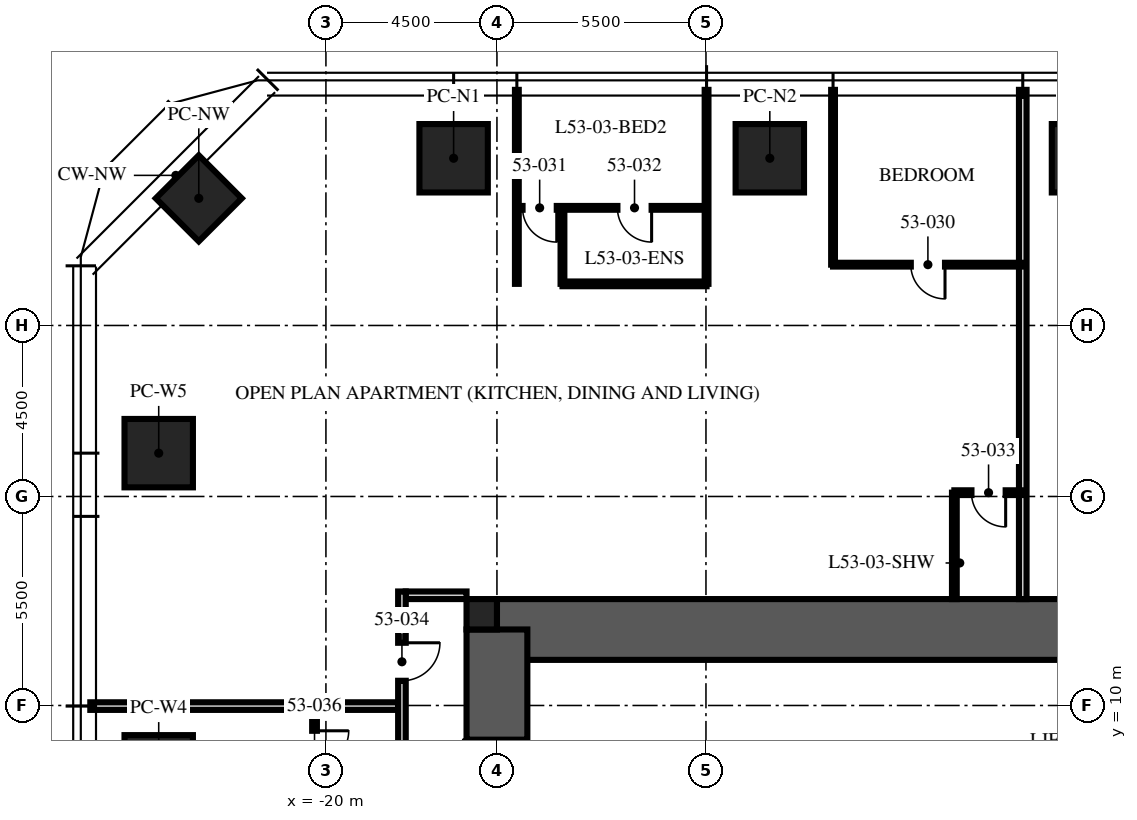
"""IFC4 building model, lengths in metres.
Left out: names, types, materials, properties, quantities, classifications, styles, units other than length and angle.
Written with IfcOpenShell. Run it as: python <this file> out.ifc"""

import sys

from ifc_helpers import new_model, si_unit, direction, frame, frame_2d, origin, origin_2d, place, context, subcontext, project, spatial, rectangle, extrude, element, fill, save


model = new_model("IFC4")
c1 = context("Model", 3, precision=1e-05, world=origin(), true_north=direction((0.0, 1.0)))
c2 = subcontext(c1, "Body", "Model", "MODEL_VIEW")
j1 = project(units=[si_unit("LENGTHUNIT", "METRE"), si_unit("PLANEANGLEUNIT", "RADIAN")], contexts=[c1])
p1 = place(None, origin())
s1 = spatial("IfcSite", under=j1, at=p1, CompositionType="ELEMENT")
p2 = place(p1, origin())
s2 = spatial("IfcBuilding", under=s1, at=p2, CompositionType="ELEMENT")
p3 = place(p2, frame((0.0, 0.0, 214.5)))
s3 = spatial("IfcBuildingStorey", under=s2, at=p3, CompositionType="ELEMENT", Elevation=214.5)
p4 = place(p3, frame((-15.5, 12.0, -0.25), z_axis=(0.0, 0.0, 1.0), x_axis=(1.0, 0.0, 0.0)))
e1 = element("IfcWall", 1, at=p4, inside=s3, PredefinedType="SHEAR", context=c2, shape_type="SweptSolid", body=[
    extrude(rectangle(XDim=31.0, YDim=1.6, at=frame_2d((15.5, 0.0))), origin(), (0.0, 0.0, 1.0), 3.75),
])
p5 = place(p3, frame((-15.5, -12.0, -0.25), z_axis=(0.0, 0.0, 1.0), x_axis=(0.0, 1.0, 0.0)))
e2 = element("IfcWall", 2, at=p5, inside=s3, PredefinedType="SHEAR", context=c2, shape_type="SweptSolid", body=[
    extrude(rectangle(XDim=24.0, YDim=1.6, at=frame_2d((12.0, 0.0))), origin(), (0.0, 0.0, 1.0), 3.75),
])
p6 = place(p5, frame((3.2, 0.0, 0.25)))
e3 = element("IfcOpeningElement", 3, at=p6, cuts=e2, PredefinedType="OPENING", context=c2, shape_type="SweptSolid", body=[
    extrude(rectangle(XDim=1.2, YDim=2.1, at=frame_2d((0.6, 1.05))), frame((0.0, 0.81, 0.0), z_axis=(0.0, -1.0, 0.0), x_axis=(1.0, 0.0, 0.0)), (0.0, 0.0, 1.0), 1.62),
])
p7 = place(p5, frame((19.3, 0.0, 0.25)))
e4 = element("IfcOpeningElement", 4, at=p7, cuts=e2, PredefinedType="OPENING", context=c2, shape_type="SweptSolid", body=[
    extrude(rectangle(XDim=1.8, YDim=2.1, at=frame_2d((0.9, 1.05))), frame((0.0, 0.81, 0.0), z_axis=(0.0, -1.0, 0.0), x_axis=(1.0, 0.0, 0.0)), (0.0, 0.0, 1.0), 1.62),
])
p8 = place(p3, frame((-15.9, 12.4, -0.25), z_axis=(0.0, 0.0, 1.0), x_axis=(1.0, 0.0, 0.0)))
e5 = element("IfcColumn", 5, at=p8, inside=s3, PredefinedType="COLUMN", context=c2, shape_type="SweptSolid", body=[
    extrude(rectangle(XDim=0.8, YDim=0.8, at=origin_2d()), origin(), (0.0, 0.0, 1.0), 3.75),
])
for number, where, z_axis, x_axis in (
    (6, (-16.64, 24.4, 0.0), (0.0, 0.0, 1.0), (1.0, 0.0, 0.0)),
    (7, (-8.32, 24.4, 0.0), (0.0, 0.0, 1.0), (1.0, 0.0, 0.0)),
    (8, (0.0, 24.4, 0.0), (0.0, 0.0, 1.0), (1.0, 0.0, 0.0)),
    (9, (-24.4, 8.32, 0.0), (0.0, 0.0, 1.0), (0.0, 1.0, 0.0)),
    (10, (-24.4, 16.64, 0.0), (0.0, 0.0, 1.0), (0.0, 1.0, 0.0)),
):
    element("IfcColumn", number, at=place(p3, frame(where, z_axis=z_axis, x_axis=x_axis)), inside=s3, PredefinedType="COLUMN", context=c2, shape_type="SweptSolid", body=[
        extrude(rectangle(XDim=1.8, YDim=1.8, at=origin_2d()), origin(), (0.0, 0.0, 1.0), 3.75),
    ])
p9 = place(p3, frame((-23.346, 23.346, 0.0), z_axis=(0.0, 0.0, 1.0), x_axis=(0.707106781187, 0.707106781187, 0.0)))
e11 = element("IfcColumn", 11, at=p9, inside=s3, PredefinedType="COLUMN", context=c2, shape_type="SweptSolid", body=[
    extrude(rectangle(XDim=1.6, YDim=1.6, at=origin_2d()), origin(), (0.0, 0.0, 1.0), 3.75),
])
p10 = place(p3, frame((-16.3, 12.9, 0.0), z_axis=(0.0, 0.0, 1.0), x_axis=(-1.0, 0.0, 0.0)))
e12 = element("IfcWall", 12, at=p10, inside=s3, PredefinedType="PARTITIONING", context=c2, shape_type="SweptSolid", body=[
    extrude(rectangle(XDim=1.6, YDim=0.2, at=frame_2d((0.8, 0.0))), origin(), (0.0, 0.0, 1.0), 2.3),
])
p11 = place(p3, frame((-1.664, 12.8, 0.0), z_axis=(0.0, 0.0, 1.0), x_axis=(0.0, 1.0, 0.0)))
e13 = element("IfcWall", 13, at=p11, inside=s3, PredefinedType="PARTITIONING", context=c2, shape_type="SweptSolid", body=[
    extrude(rectangle(XDim=13.4, YDim=0.2, at=frame_2d((6.7, 0.0))), origin(), (0.0, 0.0, 1.0), 2.91),
])
p12 = place(p3, frame((-6.656, 21.6, 0.0), z_axis=(0.0, 0.0, 1.0), x_axis=(0.0, 1.0, 0.0)))
e14 = element("IfcWall", 14, at=p12, inside=s3, PredefinedType="PARTITIONING", context=c2, shape_type="SweptSolid", body=[
    extrude(rectangle(XDim=4.6, YDim=0.1, at=frame_2d((2.3, 0.0))), origin(), (0.0, 0.0, 1.0), 2.91),
])
for number, where, z_axis, x_axis in (
    (15, (-9.984, 21.095, 0.0), (0.0, 0.0, 1.0), (0.0, 1.0, 0.0)),
    (16, (-14.976, 21.095, 0.0), (0.0, 0.0, 1.0), (0.0, 1.0, 0.0)),
):
    element("IfcWall", number, at=place(p3, frame(where, z_axis=z_axis, x_axis=x_axis)), inside=s3, PredefinedType="PARTITIONING", context=c2, shape_type="SweptSolid", body=[
        extrude(rectangle(XDim=5.105, YDim=0.1, at=frame_2d((2.552, 0.0))), origin(), (0.0, 0.0, 1.0), 2.91),
    ])
p13 = place(p3, frame((-18.1, 9.984, 0.0), z_axis=(0.0, 0.0, 1.0), x_axis=(-1.0, 0.0, 0.0)))
e17 = element("IfcWall", 17, at=p13, inside=s3, PredefinedType="PARTITIONING", context=c2, shape_type="SweptSolid", body=[
    extrude(rectangle(XDim=8.1, YDim=0.2, at=frame_2d((4.05, 0.0))), origin(), (0.0, 0.0, 1.0), 2.91),
])
p14 = place(p3, frame((-1.664, 21.6, 0.0), z_axis=(0.0, 0.0, 1.0), x_axis=(-1.0, 0.0, 0.0)))
e18 = element("IfcWall", 18, at=p14, inside=s3, PredefinedType="PARTITIONING", context=c2, shape_type="SweptSolid", body=[
    extrude(rectangle(XDim=4.992, YDim=0.1, at=frame_2d((2.496, 0.0))), origin(), (0.0, 0.0, 1.0), 2.81),
])
p15 = place(p14, frame((2.046, 0.0, 0.0)))
e19 = element("IfcOpeningElement", 19, at=p15, cuts=e18, PredefinedType="OPENING", context=c2, shape_type="SweptSolid", body=[
    extrude(rectangle(XDim=0.9, YDim=2.1, at=frame_2d((0.45, 1.05))), frame((0.0, 0.06, 0.0), z_axis=(0.0, -1.0, 0.0), x_axis=(1.0, 0.0, 0.0)), (0.0, 0.0, 1.0), 0.12),
])
p16 = place(p3, frame((-9.984, 23.095, 0.0), z_axis=(0.0, 0.0, 1.0), x_axis=(-1.0, 0.0, 0.0)))
e20 = element("IfcWall", 20, at=p16, inside=s3, PredefinedType="PARTITIONING", context=c2, shape_type="SweptSolid", body=[
    extrude(rectangle(XDim=4.992, YDim=0.1, at=frame_2d((2.496, 0.0))), origin(), (0.0, 0.0, 1.0), 2.81),
])
p17 = place(p16, frame((3.942, 0.0, 0.0)))
e21 = element("IfcOpeningElement", 21, at=p17, cuts=e20, PredefinedType="OPENING", context=c2, shape_type="SweptSolid", body=[
    extrude(rectangle(XDim=0.9, YDim=2.1, at=frame_2d((0.45, 1.05))), frame((0.0, 0.06, 0.0), z_axis=(0.0, -1.0, 0.0), x_axis=(1.0, 0.0, 0.0)), (0.0, 0.0, 1.0), 0.12),
])
p18 = place(p16, frame((1.446, 0.0, 0.0)))
e22 = element("IfcOpeningElement", 22, at=p18, cuts=e20, PredefinedType="OPENING", context=c2, shape_type="SweptSolid", body=[
    extrude(rectangle(XDim=0.9, YDim=2.1, at=frame_2d((0.45, 1.05))), frame((0.0, 0.06, 0.0), z_axis=(0.0, -1.0, 0.0), x_axis=(1.0, 0.0, 0.0)), (0.0, 0.0, 1.0), 0.12),
])
p19 = place(p3, frame((-13.776, 21.095, 0.0), z_axis=(0.0, 0.0, 1.0), x_axis=(0.0, 1.0, 0.0)))
e23 = element("IfcWall", 23, at=p19, inside=s3, PredefinedType="PARTITIONING", context=c2, shape_type="SweptSolid", body=[
    extrude(rectangle(XDim=2.0, YDim=0.1, at=frame_2d((1.0, 0.0))), origin(), (0.0, 0.0, 1.0), 3.5),
])
p20 = place(p3, frame((-9.984, 21.095, 0.0), z_axis=(0.0, 0.0, 1.0), x_axis=(-1.0, 0.0, 0.0)))
e24 = element("IfcWall", 24, at=p20, inside=s3, PredefinedType="PARTITIONING", context=c2, shape_type="SweptSolid", body=[
    extrude(rectangle(XDim=3.792, YDim=0.125, at=frame_2d((1.896, 0.0))), origin(), (0.0, 0.0, 1.0), 2.81),
])
p21 = place(p3, frame((-1.664, 15.6, 0.0), z_axis=(0.0, 0.0, 1.0), x_axis=(-1.0, 0.0, 0.0)))
e25 = element("IfcWall", 25, at=p21, inside=s3, PredefinedType="PARTITIONING", context=c2, shape_type="SweptSolid", body=[
    extrude(rectangle(XDim=1.8, YDim=0.125, at=frame_2d((0.9, 0.0))), origin(), (0.0, 0.0, 1.0), 3.5),
])
p22 = place(p21, frame((0.45, 0.0, 0.0)))
e26 = element("IfcOpeningElement", 26, at=p22, cuts=e25, PredefinedType="OPENING", context=c2, shape_type="SweptSolid", body=[
    extrude(rectangle(XDim=0.9, YDim=2.1, at=frame_2d((0.45, 1.05))), frame((0.0, 0.073, 0.0), z_axis=(0.0, -1.0, 0.0), x_axis=(1.0, 0.0, 0.0)), (0.0, 0.0, 1.0), 0.145),
])
p23 = place(p3, frame((-3.464, 12.8, 0.0), z_axis=(0.0, 0.0, 1.0), x_axis=(0.0, 1.0, 0.0)))
e27 = element("IfcWall", 27, at=p23, inside=s3, PredefinedType="PARTITIONING", context=c2, shape_type="SweptSolid", body=[
    extrude(rectangle(XDim=2.8, YDim=0.125, at=frame_2d((1.4, 0.0))), origin(), (0.0, 0.0, 1.0), 3.5),
])
p24 = place(p3, frame((-20.3, 9.984, 0.0), z_axis=(0.0, 0.0, 1.0), x_axis=(0.0, -1.0, 0.0)))
e28 = element("IfcWall", 28, at=p24, inside=s3, PredefinedType="PARTITIONING", context=c2, shape_type="SweptSolid", body=[
    extrude(rectangle(XDim=2.2, YDim=0.125, at=frame_2d((1.1, 0.0))), origin(), (0.0, 0.0, 1.0), 2.6),
])
p25 = place(p24, frame((0.65, 0.0, 0.0)))
e29 = element("IfcOpeningElement", 29, at=p25, cuts=e28, PredefinedType="OPENING", context=c2, shape_type="SweptSolid", body=[
    extrude(rectangle(XDim=0.9, YDim=2.1, at=frame_2d((0.45, 1.05))), frame((0.0, 0.073, 0.0), z_axis=(0.0, -1.0, 0.0), x_axis=(1.0, 0.0, 0.0)), (0.0, 0.0, 1.0), 0.145),
])
p26 = place(p3, frame((-18.0, 13.0, 0.0), z_axis=(0.0, 0.0, 1.0), x_axis=(0.0, -1.0, 0.0)))
e30 = element("IfcWall", 30, at=p26, inside=s3, PredefinedType="PARTITIONING", context=c2, shape_type="SweptSolid", body=[
    extrude(rectangle(XDim=25.8, YDim=0.2, at=frame_2d((12.9, 0.0))), origin(), (0.0, 0.0, 1.0), 2.6),
])
p27 = place(p26, frame((1.35, 0.0, 0.0)))
e31 = element("IfcOpeningElement", 31, at=p27, cuts=e30, PredefinedType="OPENING", context=c2, shape_type="SweptSolid", body=[
    extrude(rectangle(XDim=1.0, YDim=2.2, at=frame_2d((0.5, 1.1))), frame((0.0, 0.11, 0.0), z_axis=(0.0, -1.0, 0.0), x_axis=(1.0, 0.0, 0.0)), (0.0, 0.0, 1.0), 0.22),
])
p28 = place(p26, frame((13.036, 0.0, 0.0)))
e32 = element("IfcOpeningElement", 32, at=p28, cuts=e30, PredefinedType="OPENING", context=c2, shape_type="SweptSolid", body=[
    extrude(rectangle(XDim=1.0, YDim=2.2, at=frame_2d((0.5, 1.1))), frame((0.0, 0.11, 0.0), z_axis=(0.0, -1.0, 0.0), x_axis=(1.0, 0.0, 0.0)), (0.0, 0.0, 1.0), 0.22),
])
p29 = place(p26, frame((23.684, 0.0, 0.0)))
e33 = element("IfcOpeningElement", 33, at=p29, cuts=e30, PredefinedType="OPENING", context=c2, shape_type="SweptSolid", body=[
    extrude(rectangle(XDim=1.0, YDim=2.2, at=frame_2d((0.5, 1.1))), frame((0.0, 0.11, 0.0), z_axis=(0.0, -1.0, 0.0), x_axis=(1.0, 0.0, 0.0)), (0.0, 0.0, 1.0), 0.22),
])
p30 = place(p7, origin())
e34 = element("IfcDoor", 34, at=p30, inside=s3, OperationType="DOUBLE_DOOR_SINGLE_SWING", PredefinedType="DOOR", context=c2, shape_type="SweptSolid", body=[
    extrude(rectangle(XDim=1.8, YDim=2.1, at=frame_2d((0.9, 1.05))), frame((0.0, 0.025, 0.0), z_axis=(0.0, -1.0, 0.0), x_axis=(1.0, 0.0, 0.0)), (0.0, 0.0, 1.0), 0.05),
])
fill(e4, e34)
p31 = place(p15, origin())
e35 = element("IfcDoor", 35, at=p31, inside=s3, OperationType="SINGLE_SWING_LEFT", PredefinedType="DOOR", context=c2, shape_type="SweptSolid", body=[
    extrude(rectangle(XDim=0.9, YDim=2.1, at=frame_2d((0.45, 1.05))), frame((0.0, 0.025, 0.0), z_axis=(0.0, -1.0, 0.0), x_axis=(1.0, 0.0, 0.0)), (0.0, 0.0, 1.0), 0.05),
])
fill(e19, e35)
p32 = place(p17, origin())
e36 = element("IfcDoor", 36, at=p32, inside=s3, OperationType="SINGLE_SWING_LEFT", PredefinedType="DOOR", context=c2, shape_type="SweptSolid", body=[
    extrude(rectangle(XDim=0.9, YDim=2.1, at=frame_2d((0.45, 1.05))), frame((0.0, 0.025, 0.0), z_axis=(0.0, -1.0, 0.0), x_axis=(1.0, 0.0, 0.0)), (0.0, 0.0, 1.0), 0.05),
])
fill(e21, e36)
p33 = place(p18, origin())
e37 = element("IfcDoor", 37, at=p33, inside=s3, OperationType="SINGLE_SWING_LEFT", PredefinedType="DOOR", context=c2, shape_type="SweptSolid", body=[
    extrude(rectangle(XDim=0.9, YDim=2.1, at=frame_2d((0.45, 1.05))), frame((0.0, 0.025, 0.0), z_axis=(0.0, -1.0, 0.0), x_axis=(1.0, 0.0, 0.0)), (0.0, 0.0, 1.0), 0.05),
])
fill(e22, e37)
p34 = place(p22, origin())
e38 = element("IfcDoor", 38, at=p34, inside=s3, OperationType="SINGLE_SWING_LEFT", PredefinedType="DOOR", context=c2, shape_type="SweptSolid", body=[
    extrude(rectangle(XDim=0.9, YDim=2.1, at=frame_2d((0.45, 1.05))), frame((0.0, 0.025, 0.0), z_axis=(0.0, -1.0, 0.0), x_axis=(1.0, 0.0, 0.0)), (0.0, 0.0, 1.0), 0.05),
])
fill(e26, e38)
p35 = place(p27, origin())
e39 = element("IfcDoor", 39, at=p35, inside=s3, OperationType="SINGLE_SWING_LEFT", PredefinedType="DOOR", context=c2, shape_type="SweptSolid", body=[
    extrude(rectangle(XDim=1.0, YDim=2.2, at=frame_2d((0.5, 1.1))), frame((0.0, 0.025, 0.0), z_axis=(0.0, -1.0, 0.0), x_axis=(1.0, 0.0, 0.0)), (0.0, 0.0, 1.0), 0.05),
])
fill(e31, e39)
p36 = place(p25, origin())
e40 = element("IfcDoor", 40, at=p36, inside=s3, OperationType="SINGLE_SWING_LEFT", PredefinedType="DOOR", context=c2, shape_type="SweptSolid", body=[
    extrude(rectangle(XDim=0.9, YDim=2.1, at=frame_2d((0.45, 1.05))), frame((0.0, 0.025, 0.0), z_axis=(0.0, -1.0, 0.0), x_axis=(1.0, 0.0, 0.0)), (0.0, 0.0, 1.0), 0.05),
])
fill(e29, e40)
save(model, sys.argv[1])
